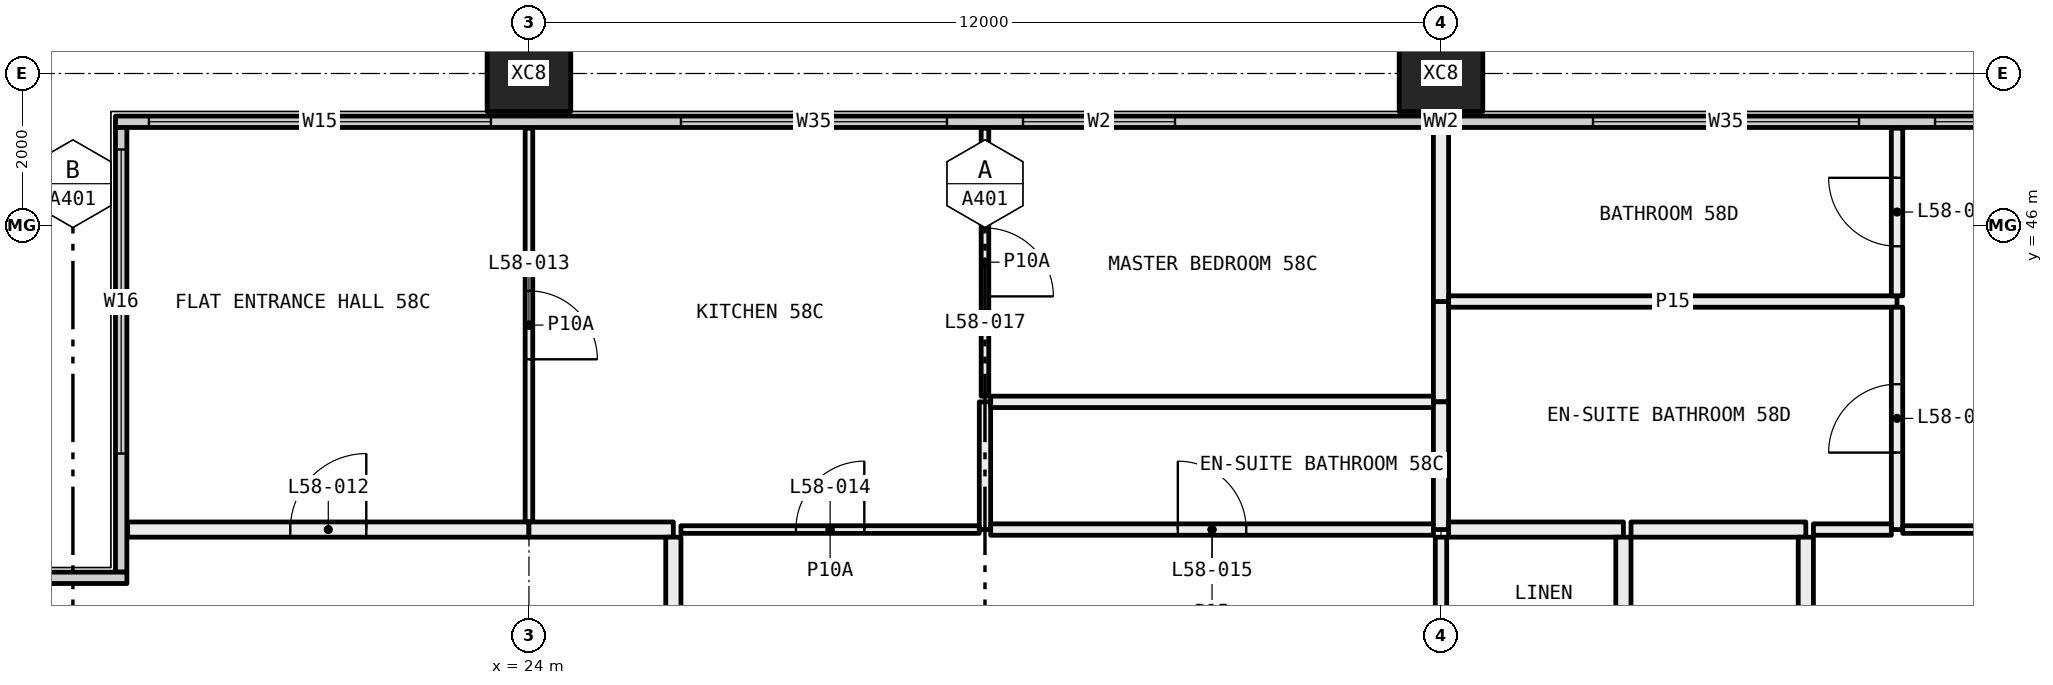
"""IFC4 building model, lengths in metres.
Left out: names, types, materials, properties, quantities, classifications, styles, units other than length and angle.
Written with IfcOpenShell. Run it as: python <this file> out.ifc"""

import sys

from ifc_helpers import new_model, si_unit, direction, frame, frame_2d, origin, origin_2d, place, context, subcontext, project, spatial, rectangle, hollow_rectangle, extrude, element, fill, save


model = new_model("IFC4")
c1 = context("Model", 3, precision=1e-05, world=origin(), true_north=direction((0.0, 1.0)))
c2 = subcontext(c1, "Body", "Model", "MODEL_VIEW")
j1 = project(units=[si_unit("LENGTHUNIT", "METRE"), si_unit("PLANEANGLEUNIT", "RADIAN")], contexts=[c1])
p1 = place(None, origin())
s1 = spatial("IfcSite", under=j1, at=p1, CompositionType="ELEMENT")
p2 = place(p1, origin())
s2 = spatial("IfcBuilding", under=s1, at=p2, CompositionType="ELEMENT")
p3 = place(p2, frame((0.0, 0.0, 217.95)))
s3 = spatial("IfcBuildingStorey", under=s2, at=p3, CompositionType="ELEMENT", Elevation=217.95)
for number, where, z_axis, x_axis in (
    (1, (24.0, 48.0, -0.4), (0.0, 0.0, 1.0), (1.0, 0.0, 0.0)),
    (2, (36.0, 48.0, -0.4), (0.0, 0.0, 1.0), (1.0, 0.0, 0.0)),
):
    element("IfcColumn", number, at=place(p3, frame(where, z_axis=z_axis, x_axis=x_axis)), inside=s3, PredefinedType="COLUMN", context=c2, shape_type="SweptSolid", body=[
        extrude(hollow_rectangle(XDim=1.1, YDim=1.0, WallThickness=0.04, at=origin_2d()), origin(), (0.0, 0.0, 1.0), 3.45),
    ])
p4 = place(p3, frame((18.56, 47.365, 0.0), z_axis=(0.0, 0.0, 1.0), x_axis=(1.0, 0.0, 0.0)))
e3 = element("IfcWall", 3, at=p4, inside=s3, PredefinedType="ELEMENTEDWALL", context=c2, shape_type="SweptSolid", body=[
    extrude(rectangle(XDim=34.88, YDim=0.15, at=frame_2d((17.44, 0.0))), origin(), (0.0, 0.0, 1.0), 3.05),
])
p5 = place(p4, frame((0.44, 0.0, 0.45)))
e4 = element("IfcOpeningElement", 4, at=p5, cuts=e3, PredefinedType="OPENING", context=c2, shape_type="SweptSolid", body=[
    extrude(rectangle(XDim=4.5, YDim=2.55, at=frame_2d((2.25, 1.275))), frame((0.0, 0.085, 0.0), z_axis=(0.0, -1.0, 0.0), x_axis=(1.0, 0.0, 0.0)), (0.0, 0.0, 1.0), 0.17),
])
p6 = place(p4, frame((7.44, 0.0, 0.45)))
e5 = element("IfcOpeningElement", 5, at=p6, cuts=e3, PredefinedType="OPENING", context=c2, shape_type="SweptSolid", body=[
    extrude(rectangle(XDim=3.5, YDim=2.55, at=frame_2d((1.75, 1.275))), frame((0.0, 0.085, 0.0), z_axis=(0.0, -1.0, 0.0), x_axis=(1.0, 0.0, 0.0)), (0.0, 0.0, 1.0), 0.17),
])
p7 = place(p4, frame((11.94, 0.0, 0.45)))
e6 = element("IfcOpeningElement", 6, at=p7, cuts=e3, PredefinedType="OPENING", context=c2, shape_type="SweptSolid", body=[
    extrude(rectangle(XDim=2.0, YDim=2.55, at=frame_2d((1.0, 1.275))), frame((0.0, 0.085, 0.0), z_axis=(0.0, -1.0, 0.0), x_axis=(1.0, 0.0, 0.0)), (0.0, 0.0, 1.0), 0.17),
])
p8 = place(p4, frame((19.44, 0.0, 0.45)))
e7 = element("IfcOpeningElement", 7, at=p8, cuts=e3, PredefinedType="OPENING", context=c2, shape_type="SweptSolid", body=[
    extrude(rectangle(XDim=3.5, YDim=2.55, at=frame_2d((1.75, 1.275))), frame((0.0, 0.085, 0.0), z_axis=(0.0, -1.0, 0.0), x_axis=(1.0, 0.0, 0.0)), (0.0, 0.0, 1.0), 0.17),
])
p9 = place(p4, frame((23.94, 0.0, 0.45)))
e8 = element("IfcOpeningElement", 8, at=p9, cuts=e3, PredefinedType="OPENING", context=c2, shape_type="SweptSolid", body=[
    extrude(rectangle(XDim=3.5, YDim=2.55, at=frame_2d((1.75, 1.275))), frame((0.0, 0.085, 0.0), z_axis=(0.0, -1.0, 0.0), x_axis=(1.0, 0.0, 0.0)), (0.0, 0.0, 1.0), 0.17),
])
p10 = place(p4, frame((29.94, 0.0, 0.45)))
e9 = element("IfcOpeningElement", 9, at=p10, cuts=e3, PredefinedType="OPENING", context=c2, shape_type="SweptSolid", body=[
    extrude(rectangle(XDim=4.5, YDim=2.55, at=frame_2d((2.25, 1.275))), frame((0.0, 0.085, 0.0), z_axis=(0.0, -1.0, 0.0), x_axis=(1.0, 0.0, 0.0)), (0.0, 0.0, 1.0), 0.17),
])
p11 = place(p3, frame((18.635, 41.44, 0.0), z_axis=(0.0, 0.0, 1.0), x_axis=(0.0, 1.0, 0.0)))
e10 = element("IfcWall", 10, at=p11, inside=s3, PredefinedType="ELEMENTEDWALL", context=c2, shape_type="SweptSolid", body=[
    extrude(rectangle(XDim=5.85, YDim=0.15, at=frame_2d((2.925, 0.0))), origin(), (0.0, 0.0, 1.0), 3.05),
])
p12 = place(p11, frame((1.56, 0.0, 0.45)))
e11 = element("IfcOpeningElement", 11, at=p12, cuts=e10, PredefinedType="OPENING", context=c2, shape_type="SweptSolid", body=[
    extrude(rectangle(XDim=4.0, YDim=2.55, at=frame_2d((2.0, 1.275))), frame((0.0, 0.085, 0.0), z_axis=(0.0, -1.0, 0.0), x_axis=(1.0, 0.0, 0.0)), (0.0, 0.0, 1.0), 0.17),
])
p13 = place(p3, frame((12.56, 41.365, 0.0), z_axis=(0.0, 0.0, 1.0), x_axis=(1.0, 0.0, 0.0)))
e12 = element("IfcWall", 12, at=p13, inside=s3, PredefinedType="ELEMENTEDWALL", context=c2, shape_type="SweptSolid", body=[
    extrude(rectangle(XDim=6.15, YDim=0.15, at=frame_2d((3.075, 0.0))), origin(), (0.0, 0.0, 1.0), 3.05),
])
p14 = place(p13, frame((0.44, 0.0, 0.45)))
e13 = element("IfcOpeningElement", 13, at=p14, cuts=e12, PredefinedType="OPENING", context=c2, shape_type="SweptSolid", body=[
    extrude(rectangle(XDim=4.0, YDim=2.55, at=frame_2d((2.0, 1.275))), frame((0.0, 0.085, 0.0), z_axis=(0.0, -1.0, 0.0), x_axis=(1.0, 0.0, 0.0)), (0.0, 0.0, 1.0), 0.17),
])
p15 = place(p3, frame((24.0, 42.1, 0.0), z_axis=(0.0, 0.0, 1.0), x_axis=(0.0, 1.0, 0.0)))
e14 = element("IfcWall", 14, at=p15, inside=s3, PredefinedType="PARTITIONING", context=c2, shape_type="SweptSolid", body=[
    extrude(rectangle(XDim=5.18, YDim=0.1, at=frame_2d((2.59, 0.0))), origin(), (0.0, 0.0, 1.0), 3.05),
])
p16 = place(p15, frame((2.14, 0.0, 0.0)))
e15 = element("IfcOpeningElement", 15, at=p16, cuts=e14, PredefinedType="OPENING", context=c2, shape_type="SweptSolid", body=[
    extrude(rectangle(XDim=0.9, YDim=2.1, at=frame_2d((0.45, 1.05))), frame((0.0, 0.06, 0.0), z_axis=(0.0, -1.0, 0.0), x_axis=(1.0, 0.0, 0.0)), (0.0, 0.0, 1.0), 0.12),
])
p17 = place(p3, frame((18.72, 42.0, 0.0), z_axis=(0.0, 0.0, 1.0), x_axis=(1.0, 0.0, 0.0)))
e16 = element("IfcWall", 16, at=p17, inside=s3, PredefinedType="PARTITIONING", context=c2, shape_type="SweptSolid", body=[
    extrude(rectangle(XDim=5.28, YDim=0.2, at=frame_2d((2.64, 0.0))), origin(), (0.0, 0.0, 1.0), 3.05),
])
p18 = place(p17, frame((2.14, 0.0, 0.0)))
e17 = element("IfcOpeningElement", 17, at=p18, cuts=e16, PredefinedType="OPENING", context=c2, shape_type="SweptSolid", body=[
    extrude(rectangle(XDim=1.0, YDim=2.1, at=frame_2d((0.5, 1.05))), frame((0.0, 0.11, 0.0), z_axis=(0.0, -1.0, 0.0), x_axis=(1.0, 0.0, 0.0)), (0.0, 0.0, 1.0), 0.22),
])
p19 = place(p3, frame((30.0, 43.755, 0.0), z_axis=(0.0, 0.0, 1.0), x_axis=(0.0, 1.0, 0.0)))
e18 = element("IfcWall", 18, at=p19, inside=s3, PredefinedType="PARTITIONING", context=c2, shape_type="SweptSolid", body=[
    extrude(rectangle(XDim=3.525, YDim=0.1, at=frame_2d((1.763, 0.0))), origin(), (0.0, 0.0, 1.0), 3.05),
])
p20 = place(p19, frame((1.312, 0.0, 0.0)))
e19 = element("IfcOpeningElement", 19, at=p20, cuts=e18, PredefinedType="OPENING", context=c2, shape_type="SweptSolid", body=[
    extrude(rectangle(XDim=0.9, YDim=2.1, at=frame_2d((0.45, 1.05))), frame((0.0, 0.06, 0.0), z_axis=(0.0, -1.0, 0.0), x_axis=(1.0, 0.0, 0.0)), (0.0, 0.0, 1.0), 0.12),
])
p21 = place(p3, frame((30.0, 42.0, 0.0), z_axis=(0.0, 0.0, 1.0), x_axis=(0.0, 1.0, 0.0)))
e20 = element("IfcWall", 20, at=p21, inside=s3, PredefinedType="PARTITIONING", context=c2, shape_type="SweptSolid", body=[
    extrude(rectangle(XDim=1.68, YDim=0.15, at=frame_2d((0.84, 0.0))), origin(), (0.0, 0.0, 1.0), 3.05),
])
p22 = place(p3, frame((26.0, 42.0, 0.0), z_axis=(0.0, 0.0, 1.0), x_axis=(1.0, 0.0, 0.0)))
e21 = element("IfcWall", 21, at=p22, inside=s3, PredefinedType="PARTITIONING", context=c2, shape_type="SweptSolid", body=[
    extrude(rectangle(XDim=3.925, YDim=0.1, at=frame_2d((1.962, 0.0))), origin(), (0.0, 0.0, 1.0), 3.05),
])
p23 = place(p22, frame((1.512, 0.0, 0.0)))
e22 = element("IfcOpeningElement", 22, at=p23, cuts=e21, PredefinedType="OPENING", context=c2, shape_type="SweptSolid", body=[
    extrude(rectangle(XDim=0.9, YDim=2.1, at=frame_2d((0.45, 1.05))), frame((0.0, 0.06, 0.0), z_axis=(0.0, -1.0, 0.0), x_axis=(1.0, 0.0, 0.0)), (0.0, 0.0, 1.0), 0.12),
])
p24 = place(p3, frame((24.0, 42.0, 0.0), z_axis=(0.0, 0.0, 1.0), x_axis=(1.0, 0.0, 0.0)))
e23 = element("IfcWall", 23, at=p24, inside=s3, PredefinedType="PARTITIONING", context=c2, shape_type="SweptSolid", body=[
    extrude(rectangle(XDim=1.9, YDim=0.2, at=frame_2d((0.95, 0.0))), origin(), (0.0, 0.0, 1.0), 3.05),
])
p25 = place(p3, frame((30.075, 43.68, 0.0), z_axis=(0.0, 0.0, 1.0), x_axis=(1.0, 0.0, 0.0)))
e24 = element("IfcWall", 24, at=p25, inside=s3, PredefinedType="PARTITIONING", context=c2, shape_type="SweptSolid", body=[
    extrude(rectangle(XDim=5.825, YDim=0.15, at=frame_2d((2.913, 0.0))), origin(), (0.0, 0.0, 1.0), 3.05),
])
p26 = place(p3, frame((36.0, 43.68, 0.0), z_axis=(0.0, 0.0, 1.0), x_axis=(0.0, 1.0, 0.0)))
e25 = element("IfcWall", 25, at=p26, inside=s3, PredefinedType="PARTITIONING", context=c2, shape_type="SweptSolid", body=[
    extrude(rectangle(XDim=1.32, YDim=0.2, at=frame_2d((0.66, 0.0))), origin(), (0.0, 0.0, 1.0), 2.45),
])
p27 = place(p3, frame((36.0, 45.0, 0.0), z_axis=(0.0, 0.0, 1.0), x_axis=(0.0, 1.0, 0.0)))
e26 = element("IfcWall", 26, at=p27, inside=s3, PredefinedType="PARTITIONING", context=c2, shape_type="SweptSolid", body=[
    extrude(rectangle(XDim=2.28, YDim=0.2, at=frame_2d((1.14, 0.0))), origin(), (0.0, 0.0, 1.0), 2.45),
])
p28 = place(p3, frame((30.075, 42.0, 0.0), z_axis=(0.0, 0.0, 1.0), x_axis=(1.0, 0.0, 0.0)))
e27 = element("IfcWall", 27, at=p28, inside=s3, PredefinedType="PARTITIONING", context=c2, shape_type="SweptSolid", body=[
    extrude(rectangle(XDim=5.825, YDim=0.15, at=frame_2d((2.913, 0.0))), origin(), (0.0, 0.0, 1.0), 3.05),
])
p29 = place(p28, frame((2.462, 0.0, 0.0)))
e28 = element("IfcOpeningElement", 28, at=p29, cuts=e27, PredefinedType="OPENING", context=c2, shape_type="SweptSolid", body=[
    extrude(rectangle(XDim=0.9, YDim=2.1, at=frame_2d((0.45, 1.05))), frame((0.0, 0.085, 0.0), z_axis=(0.0, -1.0, 0.0), x_axis=(1.0, 0.0, 0.0)), (0.0, 0.0, 1.0), 0.17),
])
p30 = place(p3, frame((36.0, 42.0, 0.0), z_axis=(0.0, 0.0, 1.0), x_axis=(0.0, 1.0, 0.0)))
e29 = element("IfcWall", 29, at=p30, inside=s3, PredefinedType="PARTITIONING", context=c2, shape_type="SweptSolid", body=[
    extrude(rectangle(XDim=1.68, YDim=0.2, at=frame_2d((0.84, 0.0))), origin(), (0.0, 0.0, 1.0), 2.45),
])
p31 = place(p3, frame((36.0, 38.25, 0.0), z_axis=(0.0, 0.0, 1.0), x_axis=(0.0, 1.0, 0.0)))
e30 = element("IfcWall", 30, at=p31, inside=s3, PredefinedType="PARTITIONING", context=c2, shape_type="SweptSolid", body=[
    extrude(rectangle(XDim=3.65, YDim=0.15, at=frame_2d((1.825, 0.0))), origin(), (0.0, 0.0, 1.0), 2.45),
])
p32 = place(p31, frame((1.375, 0.0, 0.0)))
e31 = element("IfcOpeningElement", 31, at=p32, cuts=e30, PredefinedType="OPENING", context=c2, shape_type="SweptSolid", body=[
    extrude(rectangle(XDim=0.9, YDim=2.1, at=frame_2d((0.45, 1.05))), frame((0.0, 0.085, 0.0), z_axis=(0.0, -1.0, 0.0), x_axis=(1.0, 0.0, 0.0)), (0.0, 0.0, 1.0), 0.17),
])
p33 = place(p3, frame((25.9, 41.9, 0.0), z_axis=(0.0, 0.0, 1.0), x_axis=(0.0, -1.0, 0.0)))
e32 = element("IfcWall", 32, at=p33, inside=s3, PredefinedType="PARTITIONING", context=c2, shape_type="SweptSolid", body=[
    extrude(rectangle(XDim=5.9, YDim=0.2, at=frame_2d((2.95, 0.0))), origin(), (0.0, 0.0, 1.0), 2.45),
])
p34 = place(p3, frame((38.4, 42.0, 0.0), z_axis=(0.0, 0.0, 1.0), x_axis=(-1.0, 0.0, 0.0)))
e33 = element("IfcWall", 33, at=p34, inside=s3, PredefinedType="PARTITIONING", context=c2, shape_type="SweptSolid", body=[
    extrude(rectangle(XDim=2.3, YDim=0.2, at=frame_2d((1.15, 0.0))), origin(), (0.0, 0.0, 1.0), 3.05),
])
p35 = place(p3, frame((38.4, 38.25, 0.0), z_axis=(0.0, 0.0, 1.0), x_axis=(0.0, 1.0, 0.0)))
e34 = element("IfcWall", 34, at=p35, inside=s3, PredefinedType="PARTITIONING", context=c2, shape_type="SweptSolid", body=[
    extrude(rectangle(XDim=3.65, YDim=0.2, at=frame_2d((1.825, 0.0))), origin(), (0.0, 0.0, 1.0), 3.05),
])
p36 = place(p3, frame((42.0, 45.0, 0.0), z_axis=(0.0, 0.0, 1.0), x_axis=(-1.0, 0.0, 0.0)))
e35 = element("IfcWall", 35, at=p36, inside=s3, PredefinedType="PARTITIONING", context=c2, shape_type="SweptSolid", body=[
    extrude(rectangle(XDim=5.9, YDim=0.15, at=frame_2d((2.95, 0.0))), origin(), (0.0, 0.0, 1.0), 3.05),
])
p37 = place(p3, frame((42.0, 42.0, 0.0), z_axis=(0.0, 0.0, 1.0), x_axis=(0.0, 1.0, 0.0)))
e36 = element("IfcWall", 36, at=p37, inside=s3, PredefinedType="PARTITIONING", context=c2, shape_type="SweptSolid", body=[
    extrude(rectangle(XDim=2.925, YDim=0.15, at=frame_2d((1.462, 0.0))), origin(), (0.0, 0.0, 1.0), 3.05),
])
p38 = place(p37, frame((1.012, 0.0, 0.0)))
e37 = element("IfcOpeningElement", 37, at=p38, cuts=e36, PredefinedType="OPENING", context=c2, shape_type="SweptSolid", body=[
    extrude(rectangle(XDim=0.9, YDim=2.1, at=frame_2d((0.45, 1.05))), frame((0.0, 0.085, 0.0), z_axis=(0.0, -1.0, 0.0), x_axis=(1.0, 0.0, 0.0)), (0.0, 0.0, 1.0), 0.17),
])
p39 = place(p3, frame((40.9, 42.0, 0.0), z_axis=(0.0, 0.0, 1.0), x_axis=(1.0, 0.0, 0.0)))
e38 = element("IfcWall", 38, at=p39, inside=s3, PredefinedType="PARTITIONING", context=c2, shape_type="SweptSolid", body=[
    extrude(rectangle(XDim=1.025, YDim=0.15, at=frame_2d((0.513, 0.0))), origin(), (0.0, 0.0, 1.0), 3.05),
])
p40 = place(p3, frame((38.5, 42.0, 0.0), z_axis=(0.0, 0.0, 1.0), x_axis=(1.0, 0.0, 0.0)))
e39 = element("IfcWall", 39, at=p40, inside=s3, PredefinedType="PARTITIONING", context=c2, shape_type="SweptSolid", body=[
    extrude(rectangle(XDim=2.3, YDim=0.2, at=frame_2d((1.15, 0.0))), origin(), (0.0, 0.0, 1.0), 3.05),
])
p41 = place(p3, frame((42.0, 45.075, 0.0), z_axis=(0.0, 0.0, 1.0), x_axis=(0.0, 1.0, 0.0)))
e40 = element("IfcWall", 40, at=p41, inside=s3, PredefinedType="PARTITIONING", context=c2, shape_type="SweptSolid", body=[
    extrude(rectangle(XDim=2.205, YDim=0.15, at=frame_2d((1.103, 0.0))), origin(), (0.0, 0.0, 1.0), 3.05),
])
p42 = place(p41, frame((0.653, 0.0, 0.0)))
e41 = element("IfcOpeningElement", 41, at=p42, cuts=e40, PredefinedType="OPENING", context=c2, shape_type="SweptSolid", body=[
    extrude(rectangle(XDim=0.9, YDim=2.1, at=frame_2d((0.45, 1.05))), frame((0.0, 0.085, 0.0), z_axis=(0.0, -1.0, 0.0), x_axis=(1.0, 0.0, 0.0)), (0.0, 0.0, 1.0), 0.17),
])
p43 = place(p3, frame((42.075, 42.0, 0.0), z_axis=(0.0, 0.0, 1.0), x_axis=(1.0, 0.0, 0.0)))
e42 = element("IfcWall", 42, at=p43, inside=s3, PredefinedType="PARTITIONING", context=c2, shape_type="SweptSolid", body=[
    extrude(rectangle(XDim=3.925, YDim=0.1, at=frame_2d((1.962, 0.0))), origin(), (0.0, 0.0, 1.0), 3.05),
])
p44 = place(p43, frame((1.512, 0.0, 0.0)))
e43 = element("IfcOpeningElement", 43, at=p44, cuts=e42, PredefinedType="OPENING", context=c2, shape_type="SweptSolid", body=[
    extrude(rectangle(XDim=0.9, YDim=2.1, at=frame_2d((0.45, 1.05))), frame((0.0, 0.06, 0.0), z_axis=(0.0, -1.0, 0.0), x_axis=(1.0, 0.0, 0.0)), (0.0, 0.0, 1.0), 0.12),
])
p45 = place(p3, frame((40.8, 41.9, 0.0), z_axis=(0.0, 0.0, 1.0), x_axis=(0.0, -1.0, 0.0)))
e44 = element("IfcWall", 44, at=p45, inside=s3, PredefinedType="PARTITIONING", context=c2, shape_type="SweptSolid", body=[
    extrude(rectangle(XDim=5.9, YDim=0.2, at=frame_2d((2.95, 0.0))), origin(), (0.0, 0.0, 1.0), 2.45),
])
p46 = place(p5, origin())
e45 = element("IfcWindow", 45, at=p46, inside=s3, PartitioningType="SINGLE_PANEL", PredefinedType="WINDOW", context=c2, shape_type="SweptSolid", body=[
    extrude(rectangle(XDim=4.5, YDim=2.55, at=frame_2d((2.25, 1.275))), frame((0.0, 0.03, 0.0), z_axis=(0.0, -1.0, 0.0), x_axis=(1.0, 0.0, 0.0)), (0.0, 0.0, 1.0), 0.06),
])
fill(e4, e45)
p47 = place(p6, origin())
e46 = element("IfcWindow", 46, at=p47, inside=s3, PartitioningType="SINGLE_PANEL", PredefinedType="WINDOW", context=c2, shape_type="SweptSolid", body=[
    extrude(rectangle(XDim=3.5, YDim=2.55, at=frame_2d((1.75, 1.275))), frame((0.0, 0.03, 0.0), z_axis=(0.0, -1.0, 0.0), x_axis=(1.0, 0.0, 0.0)), (0.0, 0.0, 1.0), 0.06),
])
fill(e5, e46)
p48 = place(p7, origin())
e47 = element("IfcWindow", 47, at=p48, inside=s3, PartitioningType="SINGLE_PANEL", PredefinedType="WINDOW", context=c2, shape_type="SweptSolid", body=[
    extrude(rectangle(XDim=2.0, YDim=2.55, at=frame_2d((1.0, 1.275))), frame((0.0, 0.03, 0.0), z_axis=(0.0, -1.0, 0.0), x_axis=(1.0, 0.0, 0.0)), (0.0, 0.0, 1.0), 0.06),
])
fill(e6, e47)
p49 = place(p8, origin())
e48 = element("IfcWindow", 48, at=p49, inside=s3, PartitioningType="SINGLE_PANEL", PredefinedType="WINDOW", context=c2, shape_type="SweptSolid", body=[
    extrude(rectangle(XDim=3.5, YDim=2.55, at=frame_2d((1.75, 1.275))), frame((0.0, 0.03, 0.0), z_axis=(0.0, -1.0, 0.0), x_axis=(1.0, 0.0, 0.0)), (0.0, 0.0, 1.0), 0.06),
])
fill(e7, e48)
p50 = place(p9, origin())
e49 = element("IfcWindow", 49, at=p50, inside=s3, PartitioningType="SINGLE_PANEL", PredefinedType="WINDOW", context=c2, shape_type="SweptSolid", body=[
    extrude(rectangle(XDim=3.5, YDim=2.55, at=frame_2d((1.75, 1.275))), frame((0.0, 0.03, 0.0), z_axis=(0.0, -1.0, 0.0), x_axis=(1.0, 0.0, 0.0)), (0.0, 0.0, 1.0), 0.06),
])
fill(e8, e49)
p51 = place(p12, origin())
e50 = element("IfcWindow", 50, at=p51, inside=s3, PartitioningType="SINGLE_PANEL", PredefinedType="WINDOW", context=c2, shape_type="SweptSolid", body=[
    extrude(rectangle(XDim=4.0, YDim=2.55, at=frame_2d((2.0, 1.275))), frame((0.0, 0.03, 0.0), z_axis=(0.0, -1.0, 0.0), x_axis=(1.0, 0.0, 0.0)), (0.0, 0.0, 1.0), 0.06),
])
fill(e11, e50)
p52 = place(p18, origin())
e51 = element("IfcDoor", 51, at=p52, inside=s3, OperationType="SINGLE_SWING_LEFT", PredefinedType="DOOR", context=c2, shape_type="SweptSolid", body=[
    extrude(rectangle(XDim=1.0, YDim=2.1, at=frame_2d((0.5, 1.05))), frame((0.0, 0.025, 0.0), z_axis=(0.0, -1.0, 0.0), x_axis=(1.0, 0.0, 0.0)), (0.0, 0.0, 1.0), 0.05),
])
fill(e17, e51)
p53 = place(p16, frame((0.9, 0.0, 0.0), x_axis=(-1.0, 0.0, 0.0)))
e52 = element("IfcDoor", 52, at=p53, inside=s3, OperationType="SINGLE_SWING_LEFT", PredefinedType="DOOR", context=c2, shape_type="SweptSolid", body=[
    extrude(rectangle(XDim=0.9, YDim=2.1, at=frame_2d((0.45, 1.05))), frame((0.0, 0.025, 0.0), z_axis=(0.0, -1.0, 0.0), x_axis=(1.0, 0.0, 0.0)), (0.0, 0.0, 1.0), 0.05),
])
fill(e15, e52)
p54 = place(p23, origin())
e53 = element("IfcDoor", 53, at=p54, inside=s3, OperationType="SINGLE_SWING_LEFT", PredefinedType="DOOR", context=c2, shape_type="SweptSolid", body=[
    extrude(rectangle(XDim=0.9, YDim=2.1, at=frame_2d((0.45, 1.05))), frame((0.0, 0.025, 0.0), z_axis=(0.0, -1.0, 0.0), x_axis=(1.0, 0.0, 0.0)), (0.0, 0.0, 1.0), 0.05),
])
fill(e22, e53)
p55 = place(p29, origin())
e54 = element("IfcDoor", 54, at=p55, inside=s3, OperationType="SINGLE_SWING_RIGHT", PredefinedType="DOOR", context=c2, shape_type="SweptSolid", body=[
    extrude(rectangle(XDim=0.9, YDim=2.1, at=frame_2d((0.45, 1.05))), frame((0.0, 0.025, 0.0), z_axis=(0.0, -1.0, 0.0), x_axis=(1.0, 0.0, 0.0)), (0.0, 0.0, 1.0), 0.05),
])
fill(e28, e54)
p56 = place(p20, frame((0.9, 0.0, 0.0), x_axis=(-1.0, 0.0, 0.0)))
e55 = element("IfcDoor", 55, at=p56, inside=s3, OperationType="SINGLE_SWING_LEFT", PredefinedType="DOOR", context=c2, shape_type="SweptSolid", body=[
    extrude(rectangle(XDim=0.9, YDim=2.1, at=frame_2d((0.45, 1.05))), frame((0.0, 0.025, 0.0), z_axis=(0.0, -1.0, 0.0), x_axis=(1.0, 0.0, 0.0)), (0.0, 0.0, 1.0), 0.05),
])
fill(e19, e55)
p57 = place(p38, origin())
e56 = element("IfcDoor", 56, at=p57, inside=s3, OperationType="SINGLE_SWING_RIGHT", PredefinedType="DOOR", context=c2, shape_type="SweptSolid", body=[
    extrude(rectangle(XDim=0.9, YDim=2.1, at=frame_2d((0.45, 1.05))), frame((0.0, 0.025, 0.0), z_axis=(0.0, -1.0, 0.0), x_axis=(1.0, 0.0, 0.0)), (0.0, 0.0, 1.0), 0.05),
])
fill(e37, e56)
p58 = place(p42, origin())
e57 = element("IfcDoor", 57, at=p58, inside=s3, OperationType="SINGLE_SWING_LEFT", PredefinedType="DOOR", context=c2, shape_type="SweptSolid", body=[
    extrude(rectangle(XDim=0.9, YDim=2.1, at=frame_2d((0.45, 1.05))), frame((0.0, 0.025, 0.0), z_axis=(0.0, -1.0, 0.0), x_axis=(1.0, 0.0, 0.0)), (0.0, 0.0, 1.0), 0.05),
])
fill(e41, e57)
save(model, sys.argv[1])
